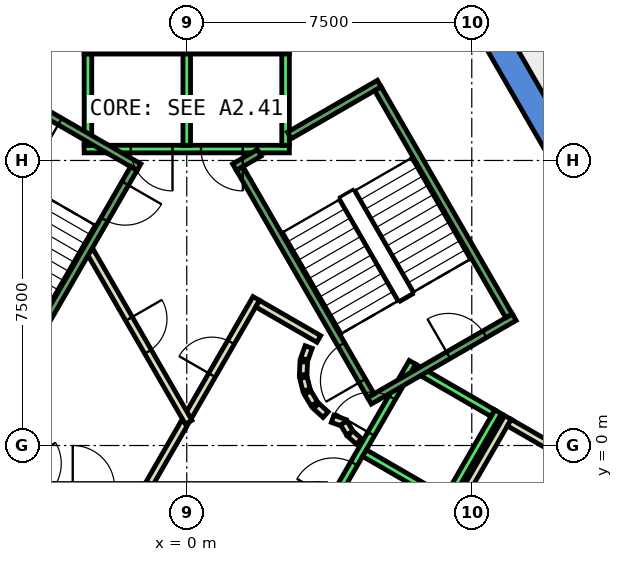
"""IFC4 building model, lengths in metres.
Left out: names, types, materials, properties, quantities, classifications, styles, units other than length and angle.
Written with IfcOpenShell. Run it as: python <this file> out.ifc"""

import sys

from ifc_helpers import new_model, si_unit, direction, frame, frame_2d, origin, place, context, subcontext, project, spatial, polyline, rectangle, outline, extrude, element, fill, save


model = new_model("IFC4")
c1 = context("Model", 3, precision=1e-05, world=origin(), true_north=direction((0.0, 1.0)))
c2 = subcontext(c1, "Body", "Model", "MODEL_VIEW")
j1 = project(units=[si_unit("LENGTHUNIT", "METRE"), si_unit("PLANEANGLEUNIT", "RADIAN")], contexts=[c1])
p1 = place(None, origin())
s1 = spatial("IfcSite", under=j1, at=p1, CompositionType="ELEMENT")
p2 = place(p1, origin())
s2 = spatial("IfcBuilding", under=s1, at=p2, CompositionType="ELEMENT")
p3 = place(p2, frame((0.0, 0.0, 202.4)))
s3 = spatial("IfcBuildingStorey", under=s2, at=p3, CompositionType="ELEMENT", Elevation=202.4)
p4 = place(p3, frame((0.0, 0.0, -0.4)))
e1 = element("IfcWall", 1, at=p4, inside=s3, PredefinedType="SHEAR", context=c2, shape_type="SweptSolid", body=[
    extrude(outline(polyline([(8.084, 11.498), (7.478, 11.148), (12.471, 2.5), (13.279, 2.5), (8.084, 11.498)])), origin(), (0.0, 0.0, 1.0), 4.2),
])
p5 = place(p3, frame((0.0, 0.0, -0.4)))
e2 = element("IfcWall", 2, at=p5, inside=s3, PredefinedType="SHEAR", context=c2, shape_type="SweptSolid", body=[
    extrude(outline(polyline([(6.64, -9.0), (13.279, 2.5), (12.471, 2.5), (6.235, -8.3), (6.64, -9.0)])), origin(), (0.0, 0.0, 1.0), 4.2),
])
p6 = place(p3, frame((5.751, -3.938, 0.0), z_axis=(0.0, 0.0, 1.0), x_axis=(0.500034260056, 0.866005622828, 0.0)))
e3 = element("IfcWall", 3, at=p6, inside=s3, PredefinedType="PARTITIONING", context=c2, shape_type="SweptSolid", body=[
    extrude(rectangle(XDim=5.399, YDim=0.2, at=frame_2d((2.7, 0.0))), origin(), (0.0, 0.0, 1.0), 3.8),
])
p7 = place(p3, frame((8.488, 0.602, 0.0), z_axis=(0.0, 0.0, 1.0), x_axis=(0.866022959057, -0.500004234368, 0.0)))
e4 = element("IfcWall", 4, at=p7, inside=s3, PredefinedType="PARTITIONING", context=c2, shape_type="SweptSolid", body=[
    extrude(rectangle(XDim=2.5, YDim=0.2, at=frame_2d((1.25, 0.0))), origin(), (0.0, 0.0, 1.0), 3.8),
])
p8 = place(p3, frame((-0.982, -1.0, 0.0), z_axis=(0.0, 0.0, 1.0), x_axis=(0.50024047865, 0.865886518847, 0.0)))
e5 = element("IfcWall", 5, at=p8, inside=s3, PredefinedType="PARTITIONING", context=c2, shape_type="SweptSolid", body=[
    extrude(rectangle(XDim=1.863, YDim=0.2, at=frame_2d((0.931, 0.0))), origin(), (0.0, 0.0, 1.0), 3.8),
])
p9 = place(p3, frame((0.05, 0.787, 0.0), z_axis=(0.0, 0.0, 1.0), x_axis=(0.499954076797, 0.866051915934, 0.0)))
e6 = element("IfcWall", 6, at=p9, inside=s3, PredefinedType="PARTITIONING", context=c2, shape_type="SweptSolid", body=[
    extrude(rectangle(XDim=3.558, YDim=0.2, at=frame_2d((1.779, 0.0))), origin(), (0.0, 0.0, 1.0), 3.8),
])
p10 = place(p9, frame((1.229, 0.0, 0.0)))
e7 = element("IfcOpeningElement", 7, at=p10, cuts=e6, PredefinedType="OPENING", context=c2, shape_type="SweptSolid", body=[
    extrude(rectangle(XDim=1.0, YDim=2.1, at=frame_2d((0.5, 1.05))), frame((0.0, 0.11, 0.0), z_axis=(0.0, -1.0, 0.0), x_axis=(1.0, 0.0, 0.0)), (0.0, 0.0, 1.0), 0.22),
])
p11 = place(p3, frame((1.866, 3.732, 0.0), z_axis=(0.0, 0.0, 1.0), x_axis=(0.866043361281, -0.499968895414, 0.0)))
e8 = element("IfcWall", 8, at=p11, inside=s3, PredefinedType="PARTITIONING", context=c2, shape_type="SweptSolid", body=[
    extrude(rectangle(XDim=1.858, YDim=0.2, at=frame_2d((0.929, 0.0))), origin(), (0.0, 0.0, 1.0), 3.8),
])
p12 = place(p3, frame((3.208, 2.592, 0.0), z_axis=(0.0, 0.0, 1.0), x_axis=(-0.337388820924, -0.941365382578, 0.0)))
e9 = element("IfcWall", 9, at=p12, inside=s3, PredefinedType="PARTITIONING", context=c2, shape_type="SweptSolid", body=[
    extrude(rectangle(XDim=0.338, YDim=0.2, at=frame_2d((0.169, 0.0))), origin(), (0.0, 0.0, 1.0), 3.8),
])
p13 = place(p3, frame((3.079, 2.199, 0.0), z_axis=(0.0, 0.0, 1.0), x_axis=(-0.047771483479, -0.998858290933, 0.0)))
e10 = element("IfcWall", 10, at=p13, inside=s3, PredefinedType="PARTITIONING", context=c2, shape_type="SweptSolid", body=[
    extrude(rectangle(XDim=0.337, YDim=0.2, at=frame_2d((0.169, 0.0))), origin(), (0.0, 0.0, 1.0), 3.8),
])
p14 = place(p3, frame((3.07, 1.786, 0.0), z_axis=(0.0, 0.0, 1.0), x_axis=(0.242705583207, -0.970099994784, 0.0)))
e11 = element("IfcWall", 11, at=p14, inside=s3, PredefinedType="PARTITIONING", context=c2, shape_type="SweptSolid", body=[
    extrude(rectangle(XDim=0.338, YDim=0.2, at=frame_2d((0.169, 0.0))), origin(), (0.0, 0.0, 1.0), 3.8),
])
for number, where, z_axis, x_axis in (
    (12, (3.182, 1.388, 0.0), (0.0, 0.0, 1.0), (0.512, -0.859, 0.0)),
    (13, (3.404, 1.039, 0.0), (0.0, 0.0, 1.0), (0.74, -0.672, 0.0)),
):
    element("IfcWall", number, at=place(p3, frame(where, z_axis=z_axis, x_axis=x_axis)), inside=s3, PredefinedType="PARTITIONING", context=c2, shape_type="SweptSolid", body=[
        extrude(rectangle(XDim=0.338, YDim=0.2, at=frame_2d((0.169, 0.0))), origin(), (0.0, 0.0, 1.0), 3.8),
    ])
p15 = place(p3, frame((3.838, 0.702, 0.0), z_axis=(0.0, 0.0, 1.0), x_axis=(0.941035081519, -0.338308993895, 0.0)))
e14 = element("IfcWall", 14, at=p15, inside=s3, PredefinedType="PARTITIONING", context=c2, shape_type="SweptSolid", body=[
    extrude(rectangle(XDim=0.337, YDim=0.2, at=frame_2d((0.168, 0.0))), origin(), (0.0, 0.0, 1.0), 3.8),
])
p16 = place(p3, frame((4.132, 0.593, 0.0), z_axis=(0.0, 0.0, 1.0), x_axis=(0.513561617048, -0.858052717201, 0.0)))
e15 = element("IfcWall", 15, at=p16, inside=s3, PredefinedType="PARTITIONING", context=c2, shape_type="SweptSolid", body=[
    extrude(rectangle(XDim=0.308, YDim=0.2, at=frame_2d((0.154, 0.0))), origin(), (0.0, 0.0, 1.0), 3.8),
])
p17 = place(p3, frame((4.301, 0.315, 0.0), z_axis=(0.0, 0.0, 1.0), x_axis=(0.741798017506, -0.670623367639, 0.0)))
e16 = element("IfcWall", 16, at=p17, inside=s3, PredefinedType="PARTITIONING", context=c2, shape_type="SweptSolid", body=[
    extrude(rectangle(XDim=0.309, YDim=0.2, at=frame_2d((0.154, 0.0))), origin(), (0.0, 0.0, 1.0), 3.8),
])
p18 = place(p3, frame((-2.54, 5.1, 0.0), z_axis=(0.0, 0.0, 1.0), x_axis=(0.499925051871, -0.866068670783, 0.0)))
e17 = element("IfcWall", 17, at=p18, inside=s3, PredefinedType="PARTITIONING", context=c2, shape_type="SweptSolid", body=[
    extrude(rectangle(XDim=5.181, YDim=0.2, at=frame_2d((2.59, 0.0))), origin(), (0.0, 0.0, 1.0), 3.8),
])
p19 = place(p18, frame((2.04, 0.0, 0.0)))
e18 = element("IfcOpeningElement", 18, at=p19, cuts=e17, PredefinedType="OPENING", context=c2, shape_type="SweptSolid", body=[
    extrude(rectangle(XDim=1.0, YDim=2.1, at=frame_2d((0.5, 1.05))), frame((0.0, 0.11, 0.0), z_axis=(0.0, -1.0, 0.0), x_axis=(1.0, 0.0, 0.0)), (0.0, 0.0, 1.0), 0.22),
])
p20 = place(p3, frame((2.7, 7.8, 0.0), z_axis=(0.0, 0.0, 1.0), x_axis=(-1.0, 0.0, 0.0)))
e19 = element("IfcWall", 19, at=p20, inside=s3, PredefinedType="STANDARD", context=c2, shape_type="SweptSolid", body=[
    extrude(rectangle(XDim=5.4, YDim=0.2, at=frame_2d((2.7, 0.0))), origin(), (0.0, 0.0, 1.0), 3.8),
])
p21 = place(p20, frame((1.225, 0.0, 0.0)))
e20 = element("IfcOpeningElement", 20, at=p21, cuts=e19, PredefinedType="OPENING", context=c2, shape_type="SweptSolid", body=[
    extrude(rectangle(XDim=1.1, YDim=2.1, at=frame_2d((0.55, 1.05))), frame((0.0, 0.11, 0.0), z_axis=(0.0, -1.0, 0.0), x_axis=(1.0, 0.0, 0.0)), (0.0, 0.0, 1.0), 0.22),
])
p22 = place(p20, frame((3.075, 0.0, 0.0)))
e21 = element("IfcOpeningElement", 21, at=p22, cuts=e19, PredefinedType="OPENING", context=c2, shape_type="SweptSolid", body=[
    extrude(rectangle(XDim=1.1, YDim=2.1, at=frame_2d((0.55, 1.05))), frame((0.0, 0.11, 0.0), z_axis=(0.0, -1.0, 0.0), x_axis=(1.0, 0.0, 0.0)), (0.0, 0.0, 1.0), 0.22),
])
p23 = place(p3, frame((2.7, 10.4, 0.0), z_axis=(0.0, 0.0, 1.0), x_axis=(-1.0, 0.0, 0.0)))
e22 = element("IfcWall", 22, at=p23, inside=s3, PredefinedType="STANDARD", context=c2, shape_type="SweptSolid", body=[
    extrude(rectangle(XDim=5.4, YDim=0.2, at=frame_2d((2.7, 0.0))), origin(), (0.0, 0.0, 1.0), 3.8),
])
for number, where, z_axis, x_axis in (
    (23, (2.6, 7.9, 0.0), (0.0, 0.0, 1.0), (0.0, 1.0, 0.0)),
    (24, (0.0, 7.9, 0.0), (0.0, 0.0, 1.0), (0.0, 1.0, 0.0)),
    (25, (-2.6, 7.9, 0.0), (0.0, 0.0, 1.0), (0.0, 1.0, 0.0)),
):
    element("IfcWall", number, at=place(p3, frame(where, z_axis=z_axis, x_axis=x_axis)), inside=s3, PredefinedType="STANDARD", context=c2, shape_type="SweptSolid", body=[
        extrude(rectangle(XDim=2.4, YDim=0.2, at=frame_2d((1.2, 0.0))), origin(), (0.0, 0.0, 1.0), 3.8),
    ])
p24 = place(p3, frame((-5.94, 2.188, 0.0), z_axis=(0.0, 0.0, 1.0), x_axis=(0.500034260056, -0.866005622828, 0.0)))
e26 = element("IfcWall", 26, at=p24, inside=s3, PredefinedType="STANDARD", context=c2, shape_type="SweptSolid", body=[
    extrude(rectangle(XDim=5.399, YDim=0.2, at=frame_2d((2.7, 0.0))), origin(), (0.0, 0.0, 1.0), 3.8),
])
p25 = place(p24, frame((3.075, 0.0, 0.0)))
e27 = element("IfcOpeningElement", 27, at=p25, cuts=e26, PredefinedType="OPENING", context=c2, shape_type="SweptSolid", body=[
    extrude(rectangle(XDim=1.1, YDim=2.1, at=frame_2d((0.55, 1.05))), frame((0.0, 0.11, 0.0), z_axis=(0.0, -1.0, 0.0), x_axis=(1.0, 0.0, 0.0)), (0.0, 0.0, 1.0), 0.22),
])
p26 = place(p24, frame((1.225, 0.0, 0.0)))
e28 = element("IfcOpeningElement", 28, at=p26, cuts=e26, PredefinedType="OPENING", context=c2, shape_type="SweptSolid", body=[
    extrude(rectangle(XDim=1.1, YDim=2.1, at=frame_2d((0.55, 1.05))), frame((0.0, 0.11, 0.0), z_axis=(0.0, -1.0, 0.0), x_axis=(1.0, 0.0, 0.0)), (0.0, 0.0, 1.0), 0.22),
])
p27 = place(p3, frame((3.24, -2.488, 0.0), z_axis=(0.0, 0.0, 1.0), x_axis=(0.500034260056, 0.866005622828, 0.0)))
e29 = element("IfcWall", 29, at=p27, inside=s3, PredefinedType="STANDARD", context=c2, shape_type="SweptSolid", body=[
    extrude(rectangle(XDim=5.399, YDim=0.2, at=frame_2d((2.7, 0.0))), origin(), (0.0, 0.0, 1.0), 3.8),
])
p28 = place(p27, frame((3.225, 0.0, 0.0)))
e30 = element("IfcOpeningElement", 30, at=p28, cuts=e29, PredefinedType="OPENING", context=c2, shape_type="SweptSolid", body=[
    extrude(rectangle(XDim=1.1, YDim=2.1, at=frame_2d((0.55, 1.05))), frame((0.0, 0.11, 0.0), z_axis=(0.0, -1.0, 0.0), x_axis=(1.0, 0.0, 0.0)), (0.0, 0.0, 1.0), 0.22),
])
p29 = place(p27, frame((1.225, 0.0, 0.0)))
e31 = element("IfcOpeningElement", 31, at=p29, cuts=e29, PredefinedType="OPENING", context=c2, shape_type="SweptSolid", body=[
    extrude(rectangle(XDim=1.1, YDim=2.1, at=frame_2d((0.55, 1.05))), frame((0.0, 0.11, 0.0), z_axis=(0.0, -1.0, 0.0), x_axis=(1.0, 0.0, 0.0)), (0.0, 0.0, 1.0), 0.22),
])
p30 = place(p3, frame((5.492, -3.788, 0.0), z_axis=(0.0, 0.0, 1.0), x_axis=(0.500034260056, 0.866005622828, 0.0)))
e32 = element("IfcWall", 32, at=p30, inside=s3, PredefinedType="STANDARD", context=c2, shape_type="SweptSolid", body=[
    extrude(rectangle(XDim=5.399, YDim=0.2, at=frame_2d((2.7, 0.0))), origin(), (0.0, 0.0, 1.0), 3.8),
])
for number, where, z_axis, x_axis in (
    (33, (4.677, -0.2, 0.0), (0.0, 0.0, 1.0), (0.866, -0.5, 0.0)),
    (34, (5.977, 2.052, 0.0), (0.0, 0.0, 1.0), (0.866, -0.5, 0.0)),
):
    element("IfcWall", number, at=place(p3, frame(where, z_axis=z_axis, x_axis=x_axis)), inside=s3, PredefinedType="STANDARD", context=c2, shape_type="SweptSolid", body=[
        extrude(rectangle(XDim=2.399, YDim=0.2, at=frame_2d((1.2, 0.0))), origin(), (0.0, 0.0, 1.0), 3.8),
    ])
p31 = place(p3, frame((4.806, 1.176, 0.0), z_axis=(0.0, 0.0, 1.0), x_axis=(0.866059941101, 0.499940174841, 0.0)))
e35 = element("IfcWall", 35, at=p31, inside=s3, PredefinedType="STANDARD", context=c2, shape_type="SweptSolid", body=[
    extrude(rectangle(XDim=4.4, YDim=0.2, at=frame_2d((2.2, 0.0))), origin(), (0.0, 0.0, 1.0), 3.8),
])
p32 = place(p31, frame((2.4, 0.0, 0.0)))
e36 = element("IfcOpeningElement", 36, at=p32, cuts=e35, PredefinedType="OPENING", context=c2, shape_type="SweptSolid", body=[
    extrude(rectangle(XDim=1.1, YDim=2.2, at=frame_2d((0.55, 1.1))), frame((0.0, 0.11, 0.0), z_axis=(0.0, -1.0, 0.0), x_axis=(1.0, 0.0, 0.0)), (0.0, 0.0, 1.0), 0.22),
])
p33 = place(p3, frame((2.7, 8.158, 0.0), z_axis=(0.0, 0.0, 1.0), x_axis=(0.86611865017, 0.499838457731, 0.0)))
e37 = element("IfcWall", 37, at=p33, inside=s3, PredefinedType="STANDARD", context=c2, shape_type="SweptSolid", body=[
    extrude(rectangle(XDim=2.733, YDim=0.2, at=frame_2d((1.366, 0.0))), origin(), (0.0, 0.0, 1.0), 3.8),
])
p34 = place(p3, frame((1.256, 7.324, 0.0), z_axis=(0.0, 0.0, 1.0), x_axis=(0.865915093549, 0.500191014278, 0.0)))
e38 = element("IfcWall", 38, at=p34, inside=s3, PredefinedType="STANDARD", context=c2, shape_type="SweptSolid", body=[
    extrude(rectangle(XDim=0.752, YDim=0.2, at=frame_2d((0.376, 0.0))), origin(), (0.0, 0.0, 1.0), 3.8),
])
p35 = place(p3, frame((4.843, 1.312, 0.0), z_axis=(0.0, 0.0, 1.0), x_axis=(-0.499963383562, 0.866046543262, 0.0)))
e39 = element("IfcWall", 39, at=p35, inside=s3, PredefinedType="STANDARD", context=c2, shape_type="SweptSolid", body=[
    extrude(rectangle(XDim=6.9, YDim=0.2, at=frame_2d((3.45, 0.0))), origin(), (0.0, 0.0, 1.0), 3.8),
])
p36 = place(p35, frame((0.45, 0.0, 0.0)))
e40 = element("IfcOpeningElement", 40, at=p36, cuts=e39, PredefinedType="OPENING", context=c2, shape_type="SweptSolid", body=[
    extrude(rectangle(XDim=1.1, YDim=2.2, at=frame_2d((0.55, 1.1))), frame((0.0, 0.11, 0.0), z_axis=(0.0, -1.0, 0.0), x_axis=(1.0, 0.0, 0.0)), (0.0, 0.0, 1.0), 0.22),
])
p37 = place(p3, frame((8.48, 3.412, 0.0), z_axis=(0.0, 0.0, 1.0), x_axis=(-0.499978703459, 0.866037698999, 0.0)))
e41 = element("IfcWall", 41, at=p37, inside=s3, PredefinedType="STANDARD", context=c2, shape_type="SweptSolid", body=[
    extrude(rectangle(XDim=6.9, YDim=0.2, at=frame_2d((3.45, 0.0))), origin(), (0.0, 0.0, 1.0), 3.8),
])
p38 = place(p3, frame((-1.256, 7.324, 0.0), z_axis=(0.0, 0.0, 1.0), x_axis=(-0.866046073146, 0.499964197906, 0.0)))
e42 = element("IfcWall", 42, at=p38, inside=s3, PredefinedType="STANDARD", context=c2, shape_type="SweptSolid", body=[
    extrude(rectangle(XDim=4.4, YDim=0.2, at=frame_2d((2.2, 0.0))), origin(), (0.0, 0.0, 1.0), 3.8),
])
p39 = place(p38, frame((2.4, 0.0, 0.0)))
e43 = element("IfcOpeningElement", 43, at=p39, cuts=e42, PredefinedType="OPENING", context=c2, shape_type="SweptSolid", body=[
    extrude(rectangle(XDim=1.1, YDim=2.2, at=frame_2d((0.55, 1.1))), frame((0.0, 0.11, 0.0), z_axis=(0.0, -1.0, 0.0), x_axis=(1.0, 0.0, 0.0)), (0.0, 0.0, 1.0), 0.22),
])
p40 = place(p3, frame((-1.393, 7.288, 0.0), z_axis=(0.0, 0.0, 1.0), x_axis=(-0.499963383562, -0.866046543262, 0.0)))
e44 = element("IfcWall", 44, at=p40, inside=s3, PredefinedType="STANDARD", context=c2, shape_type="SweptSolid", body=[
    extrude(rectangle(XDim=6.9, YDim=0.2, at=frame_2d((3.45, 0.0))), origin(), (0.0, 0.0, 1.0), 3.8),
])
p41 = place(p40, frame((0.45, 0.0, 0.0)))
e45 = element("IfcOpeningElement", 45, at=p41, cuts=e44, PredefinedType="OPENING", context=c2, shape_type="SweptSolid", body=[
    extrude(rectangle(XDim=1.1, YDim=2.2, at=frame_2d((0.55, 1.1))), frame((0.0, 0.11, 0.0), z_axis=(0.0, -1.0, 0.0), x_axis=(1.0, 0.0, 0.0)), (0.0, 0.0, 1.0), 0.22),
])
p42 = place(p10, origin())
e46 = element("IfcDoor", 46, at=p42, inside=s3, OperationType="SINGLE_SWING_RIGHT", PredefinedType="DOOR", context=c2, shape_type="SweptSolid", body=[
    extrude(rectangle(XDim=1.0, YDim=2.1, at=frame_2d((0.5, 1.05))), frame((0.0, 0.025, 0.0), z_axis=(0.0, -1.0, 0.0), x_axis=(1.0, 0.0, 0.0)), (0.0, 0.0, 1.0), 0.05),
])
fill(e7, e46)
p43 = place(p19, origin())
e47 = element("IfcDoor", 47, at=p43, inside=s3, OperationType="SINGLE_SWING_RIGHT", PredefinedType="DOOR", context=c2, shape_type="SweptSolid", body=[
    extrude(rectangle(XDim=1.0, YDim=2.1, at=frame_2d((0.5, 1.05))), frame((0.0, 0.025, 0.0), z_axis=(0.0, -1.0, 0.0), x_axis=(1.0, 0.0, 0.0)), (0.0, 0.0, 1.0), 0.05),
])
fill(e18, e47)
p44 = place(p21, origin())
e48 = element("IfcDoor", 48, at=p44, inside=s3, OperationType="SLIDING_TO_LEFT", PredefinedType="DOOR", context=c2, shape_type="SweptSolid", body=[
    extrude(rectangle(XDim=1.1, YDim=2.1, at=frame_2d((0.55, 1.05))), frame((0.0, 0.025, 0.0), z_axis=(0.0, -1.0, 0.0), x_axis=(1.0, 0.0, 0.0)), (0.0, 0.0, 1.0), 0.05),
])
fill(e20, e48)
p45 = place(p22, origin())
e49 = element("IfcDoor", 49, at=p45, inside=s3, OperationType="SLIDING_TO_LEFT", PredefinedType="DOOR", context=c2, shape_type="SweptSolid", body=[
    extrude(rectangle(XDim=1.1, YDim=2.1, at=frame_2d((0.55, 1.05))), frame((0.0, 0.025, 0.0), z_axis=(0.0, -1.0, 0.0), x_axis=(1.0, 0.0, 0.0)), (0.0, 0.0, 1.0), 0.05),
])
fill(e21, e49)
p46 = place(p28, origin())
e50 = element("IfcDoor", 50, at=p46, inside=s3, OperationType="SLIDING_TO_LEFT", PredefinedType="DOOR", context=c2, shape_type="SweptSolid", body=[
    extrude(rectangle(XDim=1.1, YDim=2.1, at=frame_2d((0.55, 1.05))), frame((0.0, 0.025, 0.0), z_axis=(0.0, -1.0, 0.0), x_axis=(1.0, 0.0, 0.0)), (0.0, 0.0, 1.0), 0.05),
])
fill(e30, e50)
p47 = place(p29, origin())
e51 = element("IfcDoor", 51, at=p47, inside=s3, OperationType="SLIDING_TO_LEFT", PredefinedType="DOOR", context=c2, shape_type="SweptSolid", body=[
    extrude(rectangle(XDim=1.1, YDim=2.1, at=frame_2d((0.55, 1.05))), frame((0.0, 0.025, 0.0), z_axis=(0.0, -1.0, 0.0), x_axis=(1.0, 0.0, 0.0)), (0.0, 0.0, 1.0), 0.05),
])
fill(e31, e51)
p48 = place(p36, origin())
e52 = element("IfcDoor", 52, at=p48, inside=s3, OperationType="SINGLE_SWING_LEFT", PredefinedType="DOOR", context=c2, shape_type="SweptSolid", body=[
    extrude(rectangle(XDim=1.1, YDim=2.2, at=frame_2d((0.55, 1.1))), frame((0.0, 0.025, 0.0), z_axis=(0.0, -1.0, 0.0), x_axis=(1.0, 0.0, 0.0)), (0.0, 0.0, 1.0), 0.05),
])
fill(e40, e52)
p49 = place(p32, origin())
e53 = element("IfcDoor", 53, at=p49, inside=s3, OperationType="SINGLE_SWING_LEFT", PredefinedType="DOOR", context=c2, shape_type="SweptSolid", body=[
    extrude(rectangle(XDim=1.1, YDim=2.2, at=frame_2d((0.55, 1.1))), frame((0.0, 0.025, 0.0), z_axis=(0.0, -1.0, 0.0), x_axis=(1.0, 0.0, 0.0)), (0.0, 0.0, 1.0), 0.05),
])
fill(e36, e53)
p50 = place(p41, origin())
e54 = element("IfcDoor", 54, at=p50, inside=s3, OperationType="SINGLE_SWING_LEFT", PredefinedType="DOOR", context=c2, shape_type="SweptSolid", body=[
    extrude(rectangle(XDim=1.1, YDim=2.2, at=frame_2d((0.55, 1.1))), frame((0.0, 0.025, 0.0), z_axis=(0.0, -1.0, 0.0), x_axis=(1.0, 0.0, 0.0)), (0.0, 0.0, 1.0), 0.05),
])
fill(e45, e54)
p51 = place(p39, origin())
e55 = element("IfcDoor", 55, at=p51, inside=s3, OperationType="SINGLE_SWING_LEFT", PredefinedType="DOOR", context=c2, shape_type="SweptSolid", body=[
    extrude(rectangle(XDim=1.1, YDim=2.2, at=frame_2d((0.55, 1.1))), frame((0.0, 0.025, 0.0), z_axis=(0.0, -1.0, 0.0), x_axis=(1.0, 0.0, 0.0)), (0.0, 0.0, 1.0), 0.05),
])
fill(e43, e55)
save(model, sys.argv[1])
